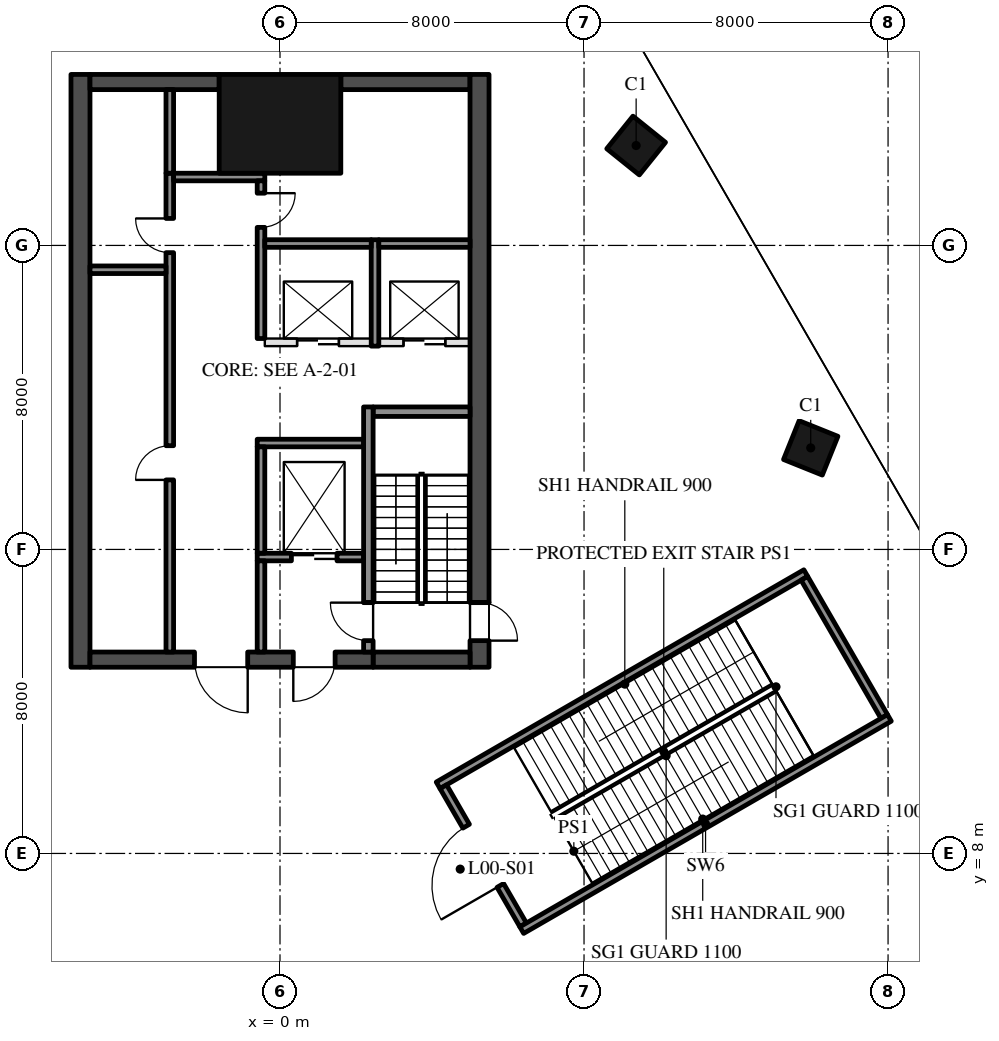
"""IFC4 building model, lengths in metres.
Left out: names, types, materials, properties, quantities, classifications, styles, units other than length and angle.
Written with IfcOpenShell. Run it as: python <this file> out.ifc"""

import sys

from ifc_helpers import new_model, si_unit, direction, frame, frame_2d, origin, origin_2d, place, context, subcontext, project, spatial, rectangle, hollow_rectangle, extrude, boolean, halfspace, element, fill, save


model = new_model("IFC4")
c1 = context("Model", 3, precision=1e-05, world=origin(), true_north=direction((0.0, 1.0)))
c2 = subcontext(c1, "Body", "Model", "MODEL_VIEW")
j1 = project(units=[si_unit("LENGTHUNIT", "METRE"), si_unit("PLANEANGLEUNIT", "RADIAN")], contexts=[c1])
p1 = place(None, origin())
s1 = spatial("IfcSite", under=j1, at=p1, CompositionType="ELEMENT")
p2 = place(p1, origin())
s2 = spatial("IfcBuilding", under=s1, at=p2, CompositionType="ELEMENT")
p3 = place(p2, origin())
s3 = spatial("IfcBuildingStorey", under=s2, at=p3, CompositionType="ELEMENT", Elevation=0.0)
p4 = place(p3, frame((18.559, 10.715, 0.0), z_axis=(-0.128630040018, -0.074254004332, 0.988908820694), x_axis=(0.499976449074, -0.866039000476, 5.184462e-06)))
e1 = element("IfcColumn", 1, at=p4, inside=s3, PredefinedType="COLUMN", context=c2, shape_type="SweptSolid", body=[
    boolean("DIFFERENCE", extrude(hollow_rectangle(XDim=1.1, YDim=1.1, WallThickness=0.05, at=origin_2d()), origin(), (0.0, 0.0, 1.0), 9.101), halfspace(frame((0.0, 0.0, 9.085), z_axis=(0.0, 0.0, 1.0), x_axis=(1.0, 0.0, 0.0)), False)),
])
p5 = place(p3, frame((13.965, 18.672, 0.0), z_axis=(-0.098570011656, -0.12580329116, 0.987146131399), x_axis=(-0.502950808814, 0.862253170424, 0.059665350136)))
e2 = element("IfcColumn", 2, at=p5, inside=s3, PredefinedType="COLUMN", context=c2, shape_type="SweptSolid", body=[
    boolean("DIFFERENCE", extrude(hollow_rectangle(XDim=1.1, YDim=1.1, WallThickness=0.05, at=origin_2d()), origin(), (0.0, 0.0, 1.0), 9.117), halfspace(frame((0.0, 0.0, 9.101), z_axis=(0.0, 0.0, 1.0), x_axis=(1.0, 0.0, 0.0)), False)),
])
p6 = place(p3, frame((9.371, 26.629, 0.0), z_axis=(-0.068374990234, -0.1765443846, 0.981914935713), x_axis=(-0.504062146009, 0.855470201781, 0.118710095719)))
e3 = element("IfcColumn", 3, at=p6, inside=s3, PredefinedType="COLUMN", context=c2, shape_type="SweptSolid", body=[
    boolean("DIFFERENCE", extrude(hollow_rectangle(XDim=1.1, YDim=1.1, WallThickness=0.05, at=origin_2d()), origin(), (0.0, 0.0, 1.0), 9.166), halfspace(frame((0.0, 0.0, 9.147), z_axis=(0.0, 0.0, 1.0), x_axis=(1.0, 0.0, 0.0)), False)),
])
p7 = place(p3, frame((0.0, 27.2, 0.0), z_axis=(0.0, 0.0, 1.0), x_axis=(1.0, 0.0, 0.0)))
e4 = element("IfcColumn", 4, at=p7, inside=s3, PredefinedType="COLUMN", context=c2, shape_type="SweptSolid", body=[
    extrude(hollow_rectangle(XDim=3.2, YDim=2.6, WallThickness=0.08, at=origin_2d()), origin(), (0.0, 0.0, 1.0), 9.0),
])
p8 = place(p3, frame((-5.25, 12.9, 0.0), z_axis=(0.0, 0.0, 1.0), x_axis=(0.0, 1.0, 0.0)))
e5 = element("IfcWall", 5, at=p8, inside=s3, PredefinedType="SHEAR", context=c2, shape_type="SweptSolid", body=[
    extrude(rectangle(XDim=15.6, YDim=0.5, at=frame_2d((7.8, 0.0))), origin(), (0.0, 0.0, 1.0), 8.7),
])
for number, where, z_axis, x_axis in (
    (6, (-1.6, 28.3, 0.0), (0.0, 0.0, 1.0), (-1.0, 0.0, 0.0)),
    (7, (5.0, 28.3, 0.0), (0.0, 0.0, 1.0), (-1.0, 0.0, 0.0)),
):
    element("IfcWall", number, at=place(p3, frame(where, z_axis=z_axis, x_axis=x_axis)), inside=s3, PredefinedType="SHEAR", context=c2, shape_type="SweptSolid", body=[
        extrude(rectangle(XDim=3.4, YDim=0.4, at=frame_2d((1.7, 0.0))), origin(), (0.0, 0.0, 1.0), 8.7),
    ])
p9 = place(p3, frame((5.0, 19.625, 0.0), z_axis=(0.0, 0.0, 1.0), x_axis=(-1.0, 0.0, 0.0)))
e8 = element("IfcWall", 8, at=p9, inside=s3, PredefinedType="SHEAR", context=c2, shape_type="SweptSolid", body=[
    extrude(rectangle(XDim=2.55, YDim=0.25, at=frame_2d((1.275, 0.0))), origin(), (0.0, 0.0, 1.0), 8.7),
])
p10 = place(p3, frame((2.2, 18.8, 0.0), z_axis=(0.0, 0.0, 1.0), x_axis=(-1.0, 0.0, 0.0)))
e9 = element("IfcWall", 9, at=p10, inside=s3, PredefinedType="SHEAR", context=c2, shape_type="SweptSolid", body=[
    extrude(rectangle(XDim=2.8, YDim=0.2, at=frame_2d((1.4, 0.0))), origin(), (0.0, 0.0, 1.0), 8.7),
])
p11 = place(p3, frame((2.2, 15.8, 0.0), z_axis=(0.0, 0.0, 1.0), x_axis=(-1.0, 0.0, 0.0)))
e10 = element("IfcWall", 10, at=p11, inside=s3, PredefinedType="SHEAR", context=c2, shape_type="SweptSolid", body=[
    extrude(rectangle(XDim=2.8, YDim=0.2, at=frame_2d((1.4, 0.0))), origin(), (0.0, 0.0, 1.0), 8.7),
])
p12 = place(p11, frame((0.7, 0.0, 0.0)))
e11 = element("IfcOpeningElement", 11, at=p12, cuts=e10, PredefinedType="OPENING", context=c2, shape_type="SweptSolid", body=[
    extrude(rectangle(XDim=1.2, YDim=2.1, at=frame_2d((0.6, 1.05))), frame((0.0, 0.11, 0.0), z_axis=(0.0, -1.0, 0.0), x_axis=(1.0, 0.0, 0.0)), (0.0, 0.0, 1.0), 0.22),
])
p13 = place(p3, frame((-0.5, 15.9, 0.0), z_axis=(0.0, 0.0, 1.0), x_axis=(0.0, 1.0, 0.0)))
e12 = element("IfcWall", 12, at=p13, inside=s3, PredefinedType="SHEAR", context=c2, shape_type="SweptSolid", body=[
    extrude(rectangle(XDim=2.8, YDim=0.2, at=frame_2d((1.4, 0.0))), origin(), (0.0, 0.0, 1.0), 8.7),
])
p14 = place(p3, frame((-0.5, 13.3, 0.0), z_axis=(0.0, 0.0, 1.0), x_axis=(0.0, 1.0, 0.0)))
e13 = element("IfcWall", 13, at=p14, inside=s3, PredefinedType="SHEAR", context=c2, shape_type="SweptSolid", body=[
    extrude(rectangle(XDim=2.4, YDim=0.2, at=frame_2d((1.2, 0.0))), origin(), (0.0, 0.0, 1.0), 8.7),
])
p15 = place(p3, frame((-2.9, 13.3, 0.0), z_axis=(0.0, 0.0, 1.0), x_axis=(0.0, 1.0, 0.0)))
e14 = element("IfcWall", 14, at=p15, inside=s3, PredefinedType="SHEAR", context=c2, shape_type="SweptSolid", body=[
    extrude(rectangle(XDim=12.6, YDim=0.2, at=frame_2d((6.3, 0.0))), origin(), (0.0, 0.0, 1.0), 8.7),
])
p16 = place(p15, frame((4.53, 0.0, 0.0)))
e15 = element("IfcOpeningElement", 15, at=p16, cuts=e14, PredefinedType="OPENING", context=c2, shape_type="SweptSolid", body=[
    extrude(rectangle(XDim=0.9, YDim=2.1, at=frame_2d((0.45, 1.05))), frame((0.0, 0.11, 0.0), z_axis=(0.0, -1.0, 0.0), x_axis=(1.0, 0.0, 0.0)), (0.0, 0.0, 1.0), 0.22),
])
p17 = place(p15, frame((10.51, 0.0, 0.0)))
e16 = element("IfcOpeningElement", 16, at=p17, cuts=e14, PredefinedType="OPENING", context=c2, shape_type="SweptSolid", body=[
    extrude(rectangle(XDim=0.9, YDim=2.1, at=frame_2d((0.45, 1.05))), frame((0.0, 0.11, 0.0), z_axis=(0.0, -1.0, 0.0), x_axis=(1.0, 0.0, 0.0)), (0.0, 0.0, 1.0), 0.22),
])
p18 = place(p3, frame((-0.4, 25.8, 0.0), z_axis=(0.0, 0.0, 1.0), x_axis=(-1.0, 0.0, 0.0)))
e17 = element("IfcWall", 17, at=p18, inside=s3, PredefinedType="SHEAR", context=c2, shape_type="SweptSolid", body=[
    extrude(rectangle(XDim=2.4, YDim=0.2, at=frame_2d((1.2, 0.0))), origin(), (0.0, 0.0, 1.0), 8.7),
])
p19 = place(p3, frame((-0.5, 21.55, 0.0), z_axis=(0.0, 0.0, 1.0), x_axis=(0.0, 1.0, 0.0)))
e18 = element("IfcWall", 18, at=p19, inside=s3, PredefinedType="SHEAR", context=c2, shape_type="SweptSolid", body=[
    extrude(rectangle(XDim=4.15, YDim=0.2, at=frame_2d((2.075, 0.0))), origin(), (0.0, 0.0, 1.0), 8.7),
])
p20 = place(p19, frame((2.925, 0.0, 0.0)))
e19 = element("IfcOpeningElement", 19, at=p20, cuts=e18, PredefinedType="OPENING", context=c2, shape_type="SweptSolid", body=[
    extrude(rectangle(XDim=0.9, YDim=2.1, at=frame_2d((0.45, 1.05))), frame((0.0, 0.11, 0.0), z_axis=(0.0, -1.0, 0.0), x_axis=(1.0, 0.0, 0.0)), (0.0, 0.0, 1.0), 0.22),
])
p21 = place(p3, frame((-3.0, 23.36, 0.0), z_axis=(0.0, 0.0, 1.0), x_axis=(-1.0, 0.0, 0.0)))
e20 = element("IfcWall", 20, at=p21, inside=s3, PredefinedType="SHEAR", context=c2, shape_type="SweptSolid", body=[
    extrude(rectangle(XDim=2.0, YDim=0.2, at=frame_2d((1.0, 0.0))), origin(), (0.0, 0.0, 1.0), 8.7),
])
p22 = place(p3, frame((-2.9, 25.9, 0.0), z_axis=(0.0, 0.0, 1.0), x_axis=(0.0, 1.0, 0.0)))
e21 = element("IfcWall", 21, at=p22, inside=s3, PredefinedType="SHEAR", context=c2, shape_type="SweptSolid", body=[
    extrude(rectangle(XDim=2.2, YDim=0.2, at=frame_2d((1.1, 0.0))), origin(), (0.0, 0.0, 1.0), 8.7),
])
p23 = place(p3, frame((2.5, 21.35, 0.0), z_axis=(0.0, 0.0, 1.0), x_axis=(0.0, 1.0, 0.0)))
e22 = element("IfcWall", 22, at=p23, inside=s3, PredefinedType="SHEAR", context=c2, shape_type="SweptSolid", body=[
    extrude(rectangle(XDim=2.8, YDim=0.2, at=frame_2d((1.4, 0.0))), origin(), (0.0, 0.0, 1.0), 8.7),
])
p24 = place(p3, frame((5.0, 24.05, 0.0), z_axis=(0.0, 0.0, 1.0), x_axis=(-1.0, 0.0, 0.0)))
e23 = element("IfcWall", 23, at=p24, inside=s3, PredefinedType="SHEAR", context=c2, shape_type="SweptSolid", body=[
    extrude(rectangle(XDim=2.4, YDim=0.2, at=frame_2d((1.2, 0.0))), origin(), (0.0, 0.0, 1.0), 8.7),
])
p25 = place(p3, frame((2.4, 24.05, 0.0), z_axis=(0.0, 0.0, 1.0), x_axis=(-1.0, 0.0, 0.0)))
e24 = element("IfcWall", 24, at=p25, inside=s3, PredefinedType="SHEAR", context=c2, shape_type="SweptSolid", body=[
    extrude(rectangle(XDim=2.8, YDim=0.2, at=frame_2d((1.4, 0.0))), origin(), (0.0, 0.0, 1.0), 8.7),
])
p26 = place(p3, frame((5.0, 21.45, 0.0), z_axis=(0.0, 0.0, 1.0), x_axis=(-1.0, 0.0, 0.0)))
e25 = element("IfcWall", 25, at=p26, inside=s3, PredefinedType="PARTITIONING", context=c2, shape_type="SweptSolid", body=[
    extrude(rectangle(XDim=2.4, YDim=0.2, at=frame_2d((1.2, 0.0))), origin(), (0.0, 0.0, 1.0), 8.7),
])
p27 = place(p26, frame((0.65, 0.0, 0.0)))
e26 = element("IfcOpeningElement", 26, at=p27, cuts=e25, PredefinedType="OPENING", context=c2, shape_type="SweptSolid", body=[
    extrude(rectangle(XDim=1.1, YDim=2.1, at=frame_2d((0.55, 1.05))), frame((0.0, 0.11, 0.0), z_axis=(0.0, -1.0, 0.0), x_axis=(1.0, 0.0, 0.0)), (0.0, 0.0, 1.0), 0.22),
])
p28 = place(p3, frame((2.4, 21.45, 0.0), z_axis=(0.0, 0.0, 1.0), x_axis=(-1.0, 0.0, 0.0)))
e27 = element("IfcWall", 27, at=p28, inside=s3, PredefinedType="PARTITIONING", context=c2, shape_type="SweptSolid", body=[
    extrude(rectangle(XDim=2.8, YDim=0.2, at=frame_2d((1.4, 0.0))), origin(), (0.0, 0.0, 1.0), 8.7),
])
p29 = place(p28, frame((0.85, 0.0, 0.0)))
e28 = element("IfcOpeningElement", 28, at=p29, cuts=e27, PredefinedType="OPENING", context=c2, shape_type="SweptSolid", body=[
    extrude(rectangle(XDim=1.1, YDim=2.1, at=frame_2d((0.55, 1.05))), frame((0.0, 0.11, 0.0), z_axis=(0.0, -1.0, 0.0), x_axis=(1.0, 0.0, 0.0)), (0.0, 0.0, 1.0), 0.22),
])
p30 = place(p3, frame((5.25, 12.9, 0.0), z_axis=(0.0, 0.0, 1.0), x_axis=(0.0, 1.0, 0.0)))
e29 = element("IfcWall", 29, at=p30, inside=s3, PredefinedType="SHEAR", context=c2, shape_type="SweptSolid", body=[
    extrude(rectangle(XDim=1.706, YDim=0.5, at=frame_2d((0.853, 0.0))), origin(), (0.0, 0.0, 1.0), 8.7),
])
p31 = place(p30, frame((0.7, 0.0, 0.0)))
e30 = element("IfcOpeningElement", 30, at=p31, cuts=e29, PredefinedType="OPENING", context=c2, shape_type="SweptSolid", body=[
    extrude(rectangle(XDim=1.0, YDim=2.1, at=frame_2d((0.5, 1.05))), frame((0.0, 0.26, 0.0), z_axis=(0.0, -1.0, 0.0), x_axis=(1.0, 0.0, 0.0)), (0.0, 0.0, 1.0), 0.52),
])
p32 = place(p3, frame((5.25, 14.606, 0.0), z_axis=(0.0, 0.0, 1.0), x_axis=(0.0, 1.0, 0.0)))
e31 = element("IfcWall", 31, at=p32, inside=s3, PredefinedType="SHEAR", context=c2, shape_type="SweptSolid", body=[
    extrude(rectangle(XDim=13.894, YDim=0.5, at=frame_2d((6.947, 0.0))), origin(), (0.0, 0.0, 1.0), 8.7),
])
p33 = place(p3, frame((5.0, 13.1, 0.0), z_axis=(0.0, 0.0, 1.0), x_axis=(-1.0, 0.0, 0.0)))
e32 = element("IfcWall", 32, at=p33, inside=s3, PredefinedType="SHEAR", context=c2, shape_type="SweptSolid", body=[
    extrude(rectangle(XDim=2.55, YDim=0.4, at=frame_2d((1.275, 0.0))), origin(), (0.0, 0.0, 1.0), 8.7),
])
p34 = place(p3, frame((2.45, 13.1, 0.0), z_axis=(0.0, 0.0, 1.0), x_axis=(-1.0, 0.0, 0.0)))
e33 = element("IfcWall", 33, at=p34, inside=s3, PredefinedType="SHEAR", context=c2, shape_type="SweptSolid", body=[
    extrude(rectangle(XDim=7.45, YDim=0.4, at=frame_2d((3.725, 0.0))), origin(), (0.0, 0.0, 1.0), 8.7),
])
p35 = place(p34, frame((1.0, 0.0, 0.0)))
e34 = element("IfcOpeningElement", 34, at=p35, cuts=e33, PredefinedType="OPENING", context=c2, shape_type="SweptSolid", body=[
    extrude(rectangle(XDim=1.1, YDim=2.1, at=frame_2d((0.55, 1.05))), frame((0.0, 0.21, 0.0), z_axis=(0.0, -1.0, 0.0), x_axis=(1.0, 0.0, 0.0)), (0.0, 0.0, 1.0), 0.42),
])
p36 = place(p34, frame((3.3, 0.0, 0.0)))
e35 = element("IfcOpeningElement", 35, at=p36, cuts=e33, PredefinedType="OPENING", context=c2, shape_type="SweptSolid", body=[
    extrude(rectangle(XDim=1.4, YDim=2.1, at=frame_2d((0.7, 1.05))), frame((0.0, 0.21, 0.0), z_axis=(0.0, -1.0, 0.0), x_axis=(1.0, 0.0, 0.0)), (0.0, 0.0, 1.0), 0.42),
])
p37 = place(p3, frame((2.325, 13.3, 0.0), z_axis=(0.0, 0.0, 1.0), x_axis=(0.0, 1.0, 0.0)))
e36 = element("IfcWall", 36, at=p37, inside=s3, PredefinedType="SHEAR", context=c2, shape_type="SweptSolid", body=[
    extrude(rectangle(XDim=1.306, YDim=0.25, at=frame_2d((0.653, 0.0))), origin(), (0.0, 0.0, 1.0), 8.7),
])
p38 = place(p37, frame((0.3, 0.0, 0.0)))
e37 = element("IfcOpeningElement", 37, at=p38, cuts=e36, PredefinedType="OPENING", context=c2, shape_type="SweptSolid", body=[
    extrude(rectangle(XDim=1.0, YDim=2.1, at=frame_2d((0.5, 1.05))), frame((0.0, 0.135, 0.0), z_axis=(0.0, -1.0, 0.0), x_axis=(1.0, 0.0, 0.0)), (0.0, 0.0, 1.0), 0.27),
])
p39 = place(p3, frame((2.325, 14.606, 0.0), z_axis=(0.0, 0.0, 1.0), x_axis=(0.0, 1.0, 0.0)))
e38 = element("IfcWall", 38, at=p39, inside=s3, PredefinedType="SHEAR", context=c2, shape_type="SweptSolid", body=[
    extrude(rectangle(XDim=5.144, YDim=0.25, at=frame_2d((2.572, 0.0))), origin(), (0.0, 0.0, 1.0), 8.7),
])
p40 = place(p3, frame((4.161, 9.792, 0.0), z_axis=(0.0, 0.0, 1.0), x_axis=(0.866019249346, 0.500010659649, 0.0)))
e39 = element("IfcWall", 39, at=p40, inside=s3, PredefinedType="SOLIDWALL", context=c2, shape_type="SweptSolid", body=[
    extrude(rectangle(XDim=11.17, YDim=0.2, at=frame_2d((5.585, 0.0))), origin(), (0.0, 0.0, 1.0), 8.7),
])
p41 = place(p3, frame((15.898, 11.604, 0.0), z_axis=(0.0, 0.0, 1.0), x_axis=(-0.500027713859, 0.866009402589, 0.0)))
e40 = element("IfcWall", 40, at=p41, inside=s3, PredefinedType="SOLIDWALL", context=c2, shape_type="SweptSolid", body=[
    extrude(rectangle(XDim=4.2, YDim=0.2, at=frame_2d((2.1, 0.0))), origin(), (0.0, 0.0, 1.0), 8.7),
])
p42 = place(p3, frame((6.398, 6.119, 0.0), z_axis=(0.0, 0.0, 1.0), x_axis=(-0.499958946799, 0.866049104564, 0.0)))
e41 = element("IfcWall", 41, at=p42, inside=s3, PredefinedType="SOLIDWALL", context=c2, shape_type="SweptSolid", body=[
    extrude(rectangle(XDim=4.2, YDim=0.2, at=frame_2d((2.1, 0.0))), origin(), (0.0, 0.0, 1.0), 8.7),
])
p43 = place(p42, frame((1.2, 0.0, 0.0)))
e42 = element("IfcOpeningElement", 42, at=p43, cuts=e41, PredefinedType="OPENING", context=c2, shape_type="SweptSolid", body=[
    extrude(rectangle(XDim=1.8, YDim=2.1, at=frame_2d((0.9, 1.05))), frame((0.0, 0.11, 0.0), z_axis=(0.0, -1.0, 0.0), x_axis=(1.0, 0.0, 0.0)), (0.0, 0.0, 1.0), 0.22),
])
p44 = place(p3, frame((6.361, 5.982, 0.0), z_axis=(0.0, 0.0, 1.0), x_axis=(0.866028713561, 0.499994267255, 0.0)))
e43 = element("IfcWall", 43, at=p44, inside=s3, PredefinedType="SOLIDWALL", context=c2, shape_type="SweptSolid", body=[
    extrude(rectangle(XDim=11.17, YDim=0.2, at=frame_2d((5.585, 0.0))), origin(), (0.0, 0.0, 1.0), 8.7),
])
p45 = place(p12, origin())
e44 = element("IfcDoor", 44, at=p45, inside=s3, OperationType="DOUBLE_DOOR_SLIDING", PredefinedType="DOOR", context=c2, shape_type="SweptSolid", body=[
    extrude(rectangle(XDim=1.2, YDim=2.1, at=frame_2d((0.6, 1.05))), frame((0.0, 0.025, 0.0), z_axis=(0.0, -1.0, 0.0), x_axis=(1.0, 0.0, 0.0)), (0.0, 0.0, 1.0), 0.05),
])
fill(e11, e44)
p46 = place(p16, origin())
e45 = element("IfcDoor", 45, at=p46, inside=s3, OperationType="SINGLE_SWING_LEFT", PredefinedType="DOOR", context=c2, shape_type="SweptSolid", body=[
    extrude(rectangle(XDim=0.9, YDim=2.1, at=frame_2d((0.45, 1.05))), frame((0.0, 0.025, 0.0), z_axis=(0.0, -1.0, 0.0), x_axis=(1.0, 0.0, 0.0)), (0.0, 0.0, 1.0), 0.05),
])
fill(e15, e45)
p47 = place(p17, origin())
e46 = element("IfcDoor", 46, at=p47, inside=s3, OperationType="SINGLE_SWING_RIGHT", PredefinedType="DOOR", context=c2, shape_type="SweptSolid", body=[
    extrude(rectangle(XDim=0.9, YDim=2.1, at=frame_2d((0.45, 1.05))), frame((0.0, 0.025, 0.0), z_axis=(0.0, -1.0, 0.0), x_axis=(1.0, 0.0, 0.0)), (0.0, 0.0, 1.0), 0.05),
])
fill(e16, e46)
p48 = place(p27, origin())
e47 = element("IfcDoor", 47, at=p48, inside=s3, OperationType="DOUBLE_DOOR_SLIDING", PredefinedType="DOOR", context=c2, shape_type="SweptSolid", body=[
    extrude(rectangle(XDim=1.1, YDim=2.1, at=frame_2d((0.55, 1.05))), frame((0.0, 0.025, 0.0), z_axis=(0.0, -1.0, 0.0), x_axis=(1.0, 0.0, 0.0)), (0.0, 0.0, 1.0), 0.05),
])
fill(e26, e47)
p49 = place(p29, origin())
e48 = element("IfcDoor", 48, at=p49, inside=s3, OperationType="DOUBLE_DOOR_SLIDING", PredefinedType="DOOR", context=c2, shape_type="SweptSolid", body=[
    extrude(rectangle(XDim=1.1, YDim=2.1, at=frame_2d((0.55, 1.05))), frame((0.0, 0.025, 0.0), z_axis=(0.0, -1.0, 0.0), x_axis=(1.0, 0.0, 0.0)), (0.0, 0.0, 1.0), 0.05),
])
fill(e28, e48)
p50 = place(p20, frame((0.9, 0.0, 0.0), z_axis=(0.0, 0.0, 1.0), x_axis=(-1.0, 0.0, 0.0)))
e49 = element("IfcDoor", 49, at=p50, inside=s3, OperationType="SINGLE_SWING_LEFT", PredefinedType="DOOR", context=c2, shape_type="SweptSolid", body=[
    extrude(rectangle(XDim=0.9, YDim=2.1, at=frame_2d((0.45, 1.05))), frame((0.0, 0.025, 0.0), z_axis=(0.0, -1.0, 0.0), x_axis=(1.0, 0.0, 0.0)), (0.0, 0.0, 1.0), 0.05),
])
fill(e19, e49)
p51 = place(p35, origin())
e50 = element("IfcDoor", 50, at=p51, inside=s3, OperationType="SINGLE_SWING_RIGHT", PredefinedType="DOOR", context=c2, shape_type="SweptSolid", body=[
    extrude(rectangle(XDim=1.1, YDim=2.1, at=frame_2d((0.55, 1.05))), frame((0.0, 0.025, 0.0), z_axis=(0.0, -1.0, 0.0), x_axis=(1.0, 0.0, 0.0)), (0.0, 0.0, 1.0), 0.05),
])
fill(e34, e50)
p52 = place(p36, origin())
e51 = element("IfcDoor", 51, at=p52, inside=s3, OperationType="DOUBLE_DOOR_SINGLE_SWING", PredefinedType="DOOR", context=c2, shape_type="SweptSolid", body=[
    extrude(rectangle(XDim=1.4, YDim=2.1, at=frame_2d((0.7, 1.05))), frame((0.0, 0.025, 0.0), z_axis=(0.0, -1.0, 0.0), x_axis=(1.0, 0.0, 0.0)), (0.0, 0.0, 1.0), 0.05),
])
fill(e35, e51)
p53 = place(p38, origin())
e52 = element("IfcDoor", 52, at=p53, inside=s3, OperationType="SINGLE_SWING_RIGHT", PredefinedType="DOOR", context=c2, shape_type="SweptSolid", body=[
    extrude(rectangle(XDim=1.0, YDim=2.1, at=frame_2d((0.5, 1.05))), frame((0.0, 0.025, 0.0), z_axis=(0.0, -1.0, 0.0), x_axis=(1.0, 0.0, 0.0)), (0.0, 0.0, 1.0), 0.05),
])
fill(e37, e52)
p54 = place(p31, frame((1.0, 0.0, 0.0), z_axis=(0.0, 0.0, 1.0), x_axis=(-1.0, 0.0, 0.0)))
e53 = element("IfcDoor", 53, at=p54, inside=s3, OperationType="SINGLE_SWING_RIGHT", PredefinedType="DOOR", context=c2, shape_type="SweptSolid", body=[
    extrude(rectangle(XDim=1.0, YDim=2.1, at=frame_2d((0.5, 1.05))), frame((0.0, 0.025, 0.0), z_axis=(0.0, -1.0, 0.0), x_axis=(1.0, 0.0, 0.0)), (0.0, 0.0, 1.0), 0.05),
])
fill(e30, e53)
p55 = place(p43, origin())
e54 = element("IfcDoor", 54, at=p55, inside=s3, OperationType="DOUBLE_DOOR_SINGLE_SWING", PredefinedType="DOOR", context=c2, shape_type="SweptSolid", body=[
    extrude(rectangle(XDim=1.8, YDim=2.1, at=frame_2d((0.9, 1.05))), frame((0.0, 0.025, 0.0), z_axis=(0.0, -1.0, 0.0), x_axis=(1.0, 0.0, 0.0)), (0.0, 0.0, 1.0), 0.05),
])
fill(e42, e54)
save(model, sys.argv[1])
